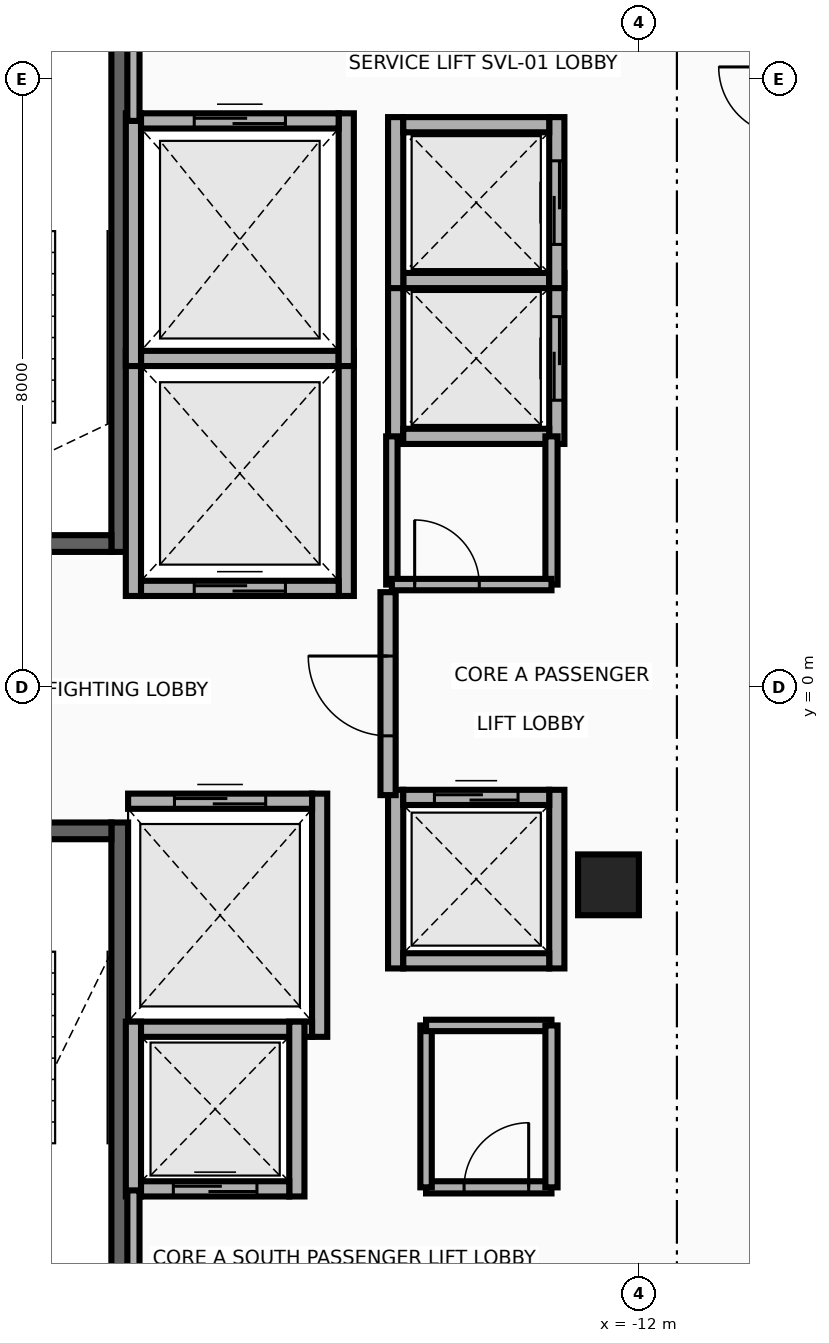
"""IFC4 building model, lengths in metres.
Left out: names, types, materials, properties, quantities, classifications, styles, units other than length and angle.
Written with IfcOpenShell. Run it as: python <this file> out.ifc"""

import sys

from ifc_helpers import new_model, si_unit, direction, frame, frame_2d, origin, origin_2d, place, context, subcontext, project, spatial, rectangle, extrude, source, transform, mapped, element, fill, save


model = new_model("IFC4")
c1 = context("Model", 3, precision=1e-05, world=origin(), true_north=direction((0.0, 1.0)))
c2 = subcontext(c1, "Body", "Model", "MODEL_VIEW")
j1 = project(units=[si_unit("LENGTHUNIT", "METRE"), si_unit("PLANEANGLEUNIT", "RADIAN")], contexts=[c1])
p1 = place(None, origin())
s1 = spatial("IfcSite", under=j1, at=p1, CompositionType="ELEMENT")
p2 = place(p1, origin())
s2 = spatial("IfcBuilding", under=s1, at=p2, CompositionType="ELEMENT")
p3 = place(p2, frame((0.0, 0.0, 258.0)))
s3 = spatial("IfcBuildingStorey", under=s2, at=p3, CompositionType="ELEMENT", Elevation=258.0)
p4 = place(p3, frame((-18.83, 1.78, 0.0), z_axis=(0.0, 0.0, 1.0), x_axis=(0.0, 1.0, 0.0)))
e1 = element("IfcWall", 1, at=p4, inside=s3, PredefinedType="SHEAR", context=c2, shape_type="SweptSolid", body=[
    extrude(rectangle(XDim=8.745, YDim=0.22, at=frame_2d((4.373, 0.0))), origin(), (0.0, 0.0, 1.0), 3.26),
])
p5 = place(p3, frame((-22.05, 1.89, 0.0), z_axis=(0.0, 0.0, 1.0), x_axis=(1.0, 0.0, 0.0)))
e2 = element("IfcWall", 2, at=p5, inside=s3, PredefinedType="SHEAR", context=c2, shape_type="SweptSolid", body=[
    extrude(rectangle(XDim=3.11, YDim=0.22, at=frame_2d((1.555, 0.0))), origin(), (0.0, 0.0, 1.0), 3.26),
])
p6 = place(p5, frame((1.0, 0.0, 0.0)))
e3 = element("IfcOpeningElement", 3, at=p6, cuts=e2, PredefinedType="OPENING", context=c2, shape_type="SweptSolid", body=[
    extrude(rectangle(XDim=1.1, YDim=2.15, at=frame_2d((0.55, 1.075))), frame((0.0, 0.125, 0.0), z_axis=(0.0, -1.0, 0.0), x_axis=(1.0, 0.0, 0.0)), (0.0, 0.0, 1.0), 0.25),
])
p7 = place(p3, frame((-18.83, -10.525, 0.0), z_axis=(0.0, 0.0, 1.0), x_axis=(0.0, 1.0, 0.0)))
e4 = element("IfcWall", 4, at=p7, inside=s3, PredefinedType="SHEAR", context=c2, shape_type="SweptSolid", body=[
    extrude(rectangle(XDim=8.745, YDim=0.22, at=frame_2d((4.373, 0.0))), origin(), (0.0, 0.0, 1.0), 3.26),
])
p8 = place(p3, frame((-22.05, -1.89, 0.0), z_axis=(0.0, 0.0, 1.0), x_axis=(1.0, 0.0, 0.0)))
e5 = element("IfcWall", 5, at=p8, inside=s3, PredefinedType="SHEAR", context=c2, shape_type="SweptSolid", body=[
    extrude(rectangle(XDim=3.11, YDim=0.22, at=frame_2d((1.555, 0.0))), origin(), (0.0, 0.0, 1.0), 3.26),
])
p9 = place(p8, frame((1.0, 0.0, 0.0)))
e6 = element("IfcOpeningElement", 6, at=p9, cuts=e5, PredefinedType="OPENING", context=c2, shape_type="SweptSolid", body=[
    extrude(rectangle(XDim=1.1, YDim=2.15, at=frame_2d((0.55, 1.075))), frame((0.0, 0.125, 0.0), z_axis=(0.0, -1.0, 0.0), x_axis=(1.0, 0.0, 0.0)), (0.0, 0.0, 1.0), 0.25),
])
m1 = source(origin(), c2, "Body", "SweptSolid", [
    extrude(rectangle(XDim=0.8, YDim=0.8, at=origin_2d()), origin(), (0.0, 0.0, 1.0), 3.5),
])
p10 = place(p3, frame((-12.4, -2.6, 0.0), z_axis=(0.0, 0.0, 1.0), x_axis=(1.0, 0.0, 0.0)))
e7 = element("IfcColumn", 7, at=p10, inside=s3, PredefinedType="COLUMN", context=c2, shape_type="MappedRepresentation", body=[
    mapped(m1, transform((0.0, 0.0, 0.0), x_axis=(1.0, 0.0, 0.0), y_axis=(0.0, 1.0, 0.0), z_axis=(0.0, 0.0, 1.0), scale=1.0)),
])
for number, where, z_axis, x_axis in (
    (8, (-18.65, 1.2, 0.0), (0.0, 0.0, 1.0), (0.0, 1.0, 0.0)),
    (9, (-15.85, 1.2, 0.0), (0.0, 0.0, 1.0), (0.0, 1.0, 0.0)),
):
    element("IfcWall", number, at=place(p3, frame(where, z_axis=z_axis, x_axis=x_axis)), inside=s3, PredefinedType="MOVABLE", context=c2, shape_type="SweptSolid", body=[
        extrude(rectangle(XDim=3.225, YDim=0.2, at=frame_2d((1.613, 0.0))), origin(), (0.0, 0.0, 1.0), 3.26),
    ])
p11 = place(p3, frame((-18.55, 1.3, 0.0), z_axis=(0.0, 0.0, 1.0), x_axis=(1.0, 0.0, 0.0)))
e10 = element("IfcWall", 10, at=p11, inside=s3, PredefinedType="MOVABLE", context=c2, shape_type="SweptSolid", body=[
    extrude(rectangle(XDim=2.6, YDim=0.2, at=frame_2d((1.3, 0.0))), origin(), (0.0, 0.0, 1.0), 3.26),
])
p12 = place(p11, frame((0.7, 0.0, 0.0)))
e11 = element("IfcOpeningElement", 11, at=p12, cuts=e10, PredefinedType="OPENING", context=c2, shape_type="SweptSolid", body=[
    extrude(rectangle(XDim=1.2, YDim=2.1, at=frame_2d((0.6, 1.05))), frame((0.0, 0.115, 0.0), z_axis=(0.0, -1.0, 0.0), x_axis=(1.0, 0.0, 0.0)), (0.0, 0.0, 1.0), 0.23),
])
p13 = place(p3, frame((-18.55, 4.325, 0.0), z_axis=(0.0, 0.0, 1.0), x_axis=(1.0, 0.0, 0.0)))
e12 = element("IfcWall", 12, at=p13, inside=s3, PredefinedType="MOVABLE", context=c2, shape_type="SweptSolid", body=[
    extrude(rectangle(XDim=2.6, YDim=0.2, at=frame_2d((1.3, 0.0))), origin(), (0.0, 0.0, 1.0), 3.26),
])
p14 = place(p3, frame((-16.2, -4.6, 0.0), z_axis=(0.0, 0.0, 1.0), x_axis=(0.0, 1.0, 0.0)))
e13 = element("IfcWall", 13, at=p14, inside=s3, PredefinedType="MOVABLE", context=c2, shape_type="SweptSolid", body=[
    extrude(rectangle(XDim=3.2, YDim=0.2, at=frame_2d((1.6, 0.0))), origin(), (0.0, 0.0, 1.0), 3.26),
])
p15 = place(p3, frame((-18.72, -4.5, 0.0), z_axis=(0.0, 0.0, 1.0), x_axis=(1.0, 0.0, 0.0)))
e14 = element("IfcWall", 14, at=p15, inside=s3, PredefinedType="MOVABLE", context=c2, shape_type="SweptSolid", body=[
    extrude(rectangle(XDim=2.42, YDim=0.2, at=frame_2d((1.21, 0.0))), origin(), (0.0, 0.0, 1.0), 3.26),
])
p16 = place(p3, frame((-18.72, -1.5, 0.0), z_axis=(0.0, 0.0, 1.0), x_axis=(1.0, 0.0, 0.0)))
e15 = element("IfcWall", 15, at=p16, inside=s3, PredefinedType="MOVABLE", context=c2, shape_type="SweptSolid", body=[
    extrude(rectangle(XDim=2.42, YDim=0.2, at=frame_2d((1.21, 0.0))), origin(), (0.0, 0.0, 1.0), 3.26),
])
p17 = place(p16, frame((0.61, 0.0, 0.0)))
e16 = element("IfcOpeningElement", 16, at=p17, cuts=e15, PredefinedType="OPENING", context=c2, shape_type="SweptSolid", body=[
    extrude(rectangle(XDim=1.2, YDim=2.1, at=frame_2d((0.6, 1.05))), frame((0.0, 0.115, 0.0), z_axis=(0.0, -1.0, 0.0), x_axis=(1.0, 0.0, 0.0)), (0.0, 0.0, 1.0), 0.23),
])
for number, where, z_axis, x_axis in (
    (17, (-18.65, 4.225, 0.0), (0.0, 0.0, 1.0), (0.0, 1.0, 0.0)),
    (18, (-15.85, 4.225, 0.0), (0.0, 0.0, 1.0), (0.0, 1.0, 0.0)),
):
    element("IfcWall", number, at=place(p3, frame(where, z_axis=z_axis, x_axis=x_axis)), inside=s3, PredefinedType="MOVABLE", context=c2, shape_type="SweptSolid", body=[
        extrude(rectangle(XDim=3.325, YDim=0.2, at=frame_2d((1.663, 0.0))), origin(), (0.0, 0.0, 1.0), 3.26),
    ])
p18 = place(p3, frame((-18.55, 7.45, 0.0), z_axis=(0.0, 0.0, 1.0), x_axis=(1.0, 0.0, 0.0)))
e19 = element("IfcWall", 19, at=p18, inside=s3, PredefinedType="MOVABLE", context=c2, shape_type="SweptSolid", body=[
    extrude(rectangle(XDim=2.6, YDim=0.2, at=frame_2d((1.3, 0.0))), origin(), (0.0, 0.0, 1.0), 3.26),
])
p19 = place(p18, frame((0.7, 0.0, 0.0)))
e20 = element("IfcOpeningElement", 20, at=p19, cuts=e19, PredefinedType="OPENING", context=c2, shape_type="SweptSolid", body=[
    extrude(rectangle(XDim=1.2, YDim=2.1, at=frame_2d((0.6, 1.05))), frame((0.0, 0.115, 0.0), z_axis=(0.0, -1.0, 0.0), x_axis=(1.0, 0.0, 0.0)), (0.0, 0.0, 1.0), 0.23),
])
p20 = place(p3, frame((-15.2, 3.2, 0.0), z_axis=(0.0, 0.0, 1.0), x_axis=(0.0, 1.0, 0.0)))
e21 = element("IfcWall", 21, at=p20, inside=s3, PredefinedType="MOVABLE", context=c2, shape_type="SweptSolid", body=[
    extrude(rectangle(XDim=2.25, YDim=0.2, at=frame_2d((1.125, 0.0))), origin(), (0.0, 0.0, 1.0), 3.26),
])
p21 = place(p3, frame((-13.08, 3.2, 0.0), z_axis=(0.0, 0.0, 1.0), x_axis=(0.0, 1.0, 0.0)))
e22 = element("IfcWall", 22, at=p21, inside=s3, PredefinedType="MOVABLE", context=c2, shape_type="SweptSolid", body=[
    extrude(rectangle(XDim=2.25, YDim=0.2, at=frame_2d((1.125, 0.0))), origin(), (0.0, 0.0, 1.0), 3.26),
])
p22 = place(p21, frame((0.575, 0.0, 0.0)))
e23 = element("IfcOpeningElement", 23, at=p22, cuts=e22, PredefinedType="OPENING", context=c2, shape_type="SweptSolid", body=[
    extrude(rectangle(XDim=1.1, YDim=2.1, at=frame_2d((0.55, 1.05))), frame((0.0, 0.115, 0.0), z_axis=(0.0, -1.0, 0.0), x_axis=(1.0, 0.0, 0.0)), (0.0, 0.0, 1.0), 0.23),
])
for number, where, z_axis, x_axis in (
    (24, (-15.1, 3.3, 0.0), (0.0, 0.0, 1.0), (1.0, 0.0, 0.0)),
    (25, (-15.1, 5.35, 0.0), (0.0, 0.0, 1.0), (1.0, 0.0, 0.0)),
):
    element("IfcWall", number, at=place(p3, frame(where, z_axis=z_axis, x_axis=x_axis)), inside=s3, PredefinedType="MOVABLE", context=c2, shape_type="SweptSolid", body=[
        extrude(rectangle(XDim=1.92, YDim=0.2, at=frame_2d((0.96, 0.0))), origin(), (0.0, 0.0, 1.0), 3.26),
    ])
p23 = place(p3, frame((-15.2, 5.25, 0.0), z_axis=(0.0, 0.0, 1.0), x_axis=(0.0, 1.0, 0.0)))
e26 = element("IfcWall", 26, at=p23, inside=s3, PredefinedType="MOVABLE", context=c2, shape_type="SweptSolid", body=[
    extrude(rectangle(XDim=2.25, YDim=0.2, at=frame_2d((1.125, 0.0))), origin(), (0.0, 0.0, 1.0), 3.26),
])
p24 = place(p3, frame((-13.08, 5.25, 0.0), z_axis=(0.0, 0.0, 1.0), x_axis=(0.0, 1.0, 0.0)))
e27 = element("IfcWall", 27, at=p24, inside=s3, PredefinedType="MOVABLE", context=c2, shape_type="SweptSolid", body=[
    extrude(rectangle(XDim=2.25, YDim=0.2, at=frame_2d((1.125, 0.0))), origin(), (0.0, 0.0, 1.0), 3.26),
])
p25 = place(p24, frame((0.575, 0.0, 0.0)))
e28 = element("IfcOpeningElement", 28, at=p25, cuts=e27, PredefinedType="OPENING", context=c2, shape_type="SweptSolid", body=[
    extrude(rectangle(XDim=1.1, YDim=2.1, at=frame_2d((0.55, 1.05))), frame((0.0, 0.115, 0.0), z_axis=(0.0, -1.0, 0.0), x_axis=(1.0, 0.0, 0.0)), (0.0, 0.0, 1.0), 0.23),
])
p26 = place(p3, frame((-15.1, 7.4, 0.0), z_axis=(0.0, 0.0, 1.0), x_axis=(1.0, 0.0, 0.0)))
e29 = element("IfcWall", 29, at=p26, inside=s3, PredefinedType="MOVABLE", context=c2, shape_type="SweptSolid", body=[
    extrude(rectangle(XDim=1.92, YDim=0.2, at=frame_2d((0.96, 0.0))), origin(), (0.0, 0.0, 1.0), 3.26),
])
for number, where, z_axis, x_axis in (
    (30, (-18.65, -6.7, 0.0), (0.0, 0.0, 1.0), (0.0, 1.0, 0.0)),
    (31, (-16.5, -6.7, 0.0), (0.0, 0.0, 1.0), (0.0, 1.0, 0.0)),
):
    element("IfcWall", number, at=place(p3, frame(where, z_axis=z_axis, x_axis=x_axis)), inside=s3, PredefinedType="MOVABLE", context=c2, shape_type="SweptSolid", body=[
        extrude(rectangle(XDim=2.3, YDim=0.2, at=frame_2d((1.15, 0.0))), origin(), (0.0, 0.0, 1.0), 3.26),
    ])
p27 = place(p3, frame((-18.55, -6.6, 0.0), z_axis=(0.0, 0.0, 1.0), x_axis=(1.0, 0.0, 0.0)))
e32 = element("IfcWall", 32, at=p27, inside=s3, PredefinedType="MOVABLE", context=c2, shape_type="SweptSolid", body=[
    extrude(rectangle(XDim=1.95, YDim=0.2, at=frame_2d((0.975, 0.0))), origin(), (0.0, 0.0, 1.0), 3.26),
])
p28 = place(p27, frame((0.425, 0.0, 0.0)))
e33 = element("IfcOpeningElement", 33, at=p28, cuts=e32, PredefinedType="OPENING", context=c2, shape_type="SweptSolid", body=[
    extrude(rectangle(XDim=1.1, YDim=2.1, at=frame_2d((0.55, 1.05))), frame((0.0, 0.115, 0.0), z_axis=(0.0, -1.0, 0.0), x_axis=(1.0, 0.0, 0.0)), (0.0, 0.0, 1.0), 0.23),
])
for number, where, z_axis, x_axis in (
    (34, (-15.2, -3.7, 0.0), (0.0, 0.0, 1.0), (0.0, 1.0, 0.0)),
    (35, (-13.08, -3.7, 0.0), (0.0, 0.0, 1.0), (0.0, 1.0, 0.0)),
):
    element("IfcWall", number, at=place(p3, frame(where, z_axis=z_axis, x_axis=x_axis)), inside=s3, PredefinedType="MOVABLE", context=c2, shape_type="SweptSolid", body=[
        extrude(rectangle(XDim=2.35, YDim=0.2, at=frame_2d((1.175, 0.0))), origin(), (0.0, 0.0, 1.0), 3.26),
    ])
p29 = place(p3, frame((-15.1, -3.6, 0.0), z_axis=(0.0, 0.0, 1.0), x_axis=(1.0, 0.0, 0.0)))
e36 = element("IfcWall", 36, at=p29, inside=s3, PredefinedType="MOVABLE", context=c2, shape_type="SweptSolid", body=[
    extrude(rectangle(XDim=1.92, YDim=0.2, at=frame_2d((0.96, 0.0))), origin(), (0.0, 0.0, 1.0), 3.26),
])
p30 = place(p3, frame((-15.1, -1.45, 0.0), z_axis=(0.0, 0.0, 1.0), x_axis=(1.0, 0.0, 0.0)))
e37 = element("IfcWall", 37, at=p30, inside=s3, PredefinedType="MOVABLE", context=c2, shape_type="SweptSolid", body=[
    extrude(rectangle(XDim=1.92, YDim=0.2, at=frame_2d((0.96, 0.0))), origin(), (0.0, 0.0, 1.0), 3.26),
])
p31 = place(p30, frame((0.41, 0.0, 0.0)))
e38 = element("IfcOpeningElement", 38, at=p31, cuts=e37, PredefinedType="OPENING", context=c2, shape_type="SweptSolid", body=[
    extrude(rectangle(XDim=1.1, YDim=2.1, at=frame_2d((0.55, 1.05))), frame((0.0, 0.115, 0.0), z_axis=(0.0, -1.0, 0.0), x_axis=(1.0, 0.0, 0.0)), (0.0, 0.0, 1.0), 0.23),
])
p32 = place(p3, frame((-15.3, -1.42, 0.0), z_axis=(0.0, 0.0, 1.0), x_axis=(0.0, 1.0, 0.0)))
e39 = element("IfcWall", 39, at=p32, inside=s3, PredefinedType="PARTITIONING", context=c2, shape_type="SweptSolid", body=[
    extrude(rectangle(XDim=2.67, YDim=0.2, at=frame_2d((1.335, 0.0))), origin(), (0.0, 0.0, 1.0), 3.26),
])
p33 = place(p32, frame((0.78, 0.0, 0.0)))
e40 = element("IfcOpeningElement", 40, at=p33, cuts=e39, PredefinedType="OPENING", context=c2, shape_type="SweptSolid", body=[
    extrude(rectangle(XDim=1.05, YDim=2.15, at=frame_2d((0.525, 1.075))), frame((0.0, 0.115, 0.0), z_axis=(0.0, -1.0, 0.0), x_axis=(1.0, 0.0, 0.0)), (0.0, 0.0, 1.0), 0.23),
])
p34 = place(p3, frame((-18.65, 7.45, 0.0), z_axis=(0.0, 0.0, 1.0), x_axis=(0.0, 1.0, 0.0)))
e41 = element("IfcWall", 41, at=p34, inside=s3, PredefinedType="PARTITIONING", context=c2, shape_type="SweptSolid", body=[
    extrude(rectangle(XDim=2.93, YDim=0.16, at=frame_2d((1.465, 0.0))), origin(), (0.0, 0.0, 1.0), 3.26),
])
p35 = place(p3, frame((-18.65, -8.18, 0.0), z_axis=(0.0, 0.0, 1.0), x_axis=(0.0, 1.0, 0.0)))
e42 = element("IfcWall", 42, at=p35, inside=s3, PredefinedType="PARTITIONING", context=c2, shape_type="SweptSolid", body=[
    extrude(rectangle(XDim=1.56, YDim=0.16, at=frame_2d((0.78, 0.0))), origin(), (0.0, 0.0, 1.0), 3.26),
])
p36 = place(p3, frame((-14.8, -6.58, 0.0), z_axis=(0.0, 0.0, 1.0), x_axis=(1.0, 0.0, 0.0)))
e43 = element("IfcWall", 43, at=p36, inside=s3, PredefinedType="PARTITIONING", context=c2, shape_type="SweptSolid", body=[
    extrude(rectangle(XDim=1.65, YDim=0.16, at=frame_2d((0.825, 0.0))), origin(), (0.0, 0.0, 1.0), 3.26),
])
p37 = place(p36, frame((0.5, 0.0, 0.0)))
e44 = element("IfcOpeningElement", 44, at=p37, cuts=e43, PredefinedType="OPENING", context=c2, shape_type="SweptSolid", body=[
    extrude(rectangle(XDim=0.85, YDim=2.05, at=frame_2d((0.425, 1.025))), frame((0.0, 0.095, 0.0), z_axis=(0.0, -1.0, 0.0), x_axis=(1.0, 0.0, 0.0)), (0.0, 0.0, 1.0), 0.19),
])
p38 = place(p3, frame((-14.8, -6.58, 0.0), z_axis=(0.0, 0.0, 1.0), x_axis=(0.0, 1.0, 0.0)))
e45 = element("IfcWall", 45, at=p38, inside=s3, PredefinedType="PARTITIONING", context=c2, shape_type="SweptSolid", body=[
    extrude(rectangle(XDim=2.13, YDim=0.15, at=frame_2d((1.065, 0.0))), origin(), (0.0, 0.0, 1.0), 3.26),
])
p39 = place(p3, frame((-14.8, -4.45, 0.0), z_axis=(0.0, 0.0, 1.0), x_axis=(1.0, 0.0, 0.0)))
e46 = element("IfcWall", 46, at=p39, inside=s3, PredefinedType="PARTITIONING", context=c2, shape_type="SweptSolid", body=[
    extrude(rectangle(XDim=1.65, YDim=0.15, at=frame_2d((0.825, 0.0))), origin(), (0.0, 0.0, 1.0), 3.26),
])
p40 = place(p3, frame((-13.15, -6.58, 0.0), z_axis=(0.0, 0.0, 1.0), x_axis=(0.0, 1.0, 0.0)))
e47 = element("IfcWall", 47, at=p40, inside=s3, PredefinedType="PARTITIONING", context=c2, shape_type="SweptSolid", body=[
    extrude(rectangle(XDim=2.13, YDim=0.16, at=frame_2d((1.065, 0.0))), origin(), (0.0, 0.0, 1.0), 3.26),
])
p41 = place(p3, frame((-13.15, 1.35, 0.0), z_axis=(0.0, 0.0, 1.0), x_axis=(0.0, 1.0, 0.0)))
e48 = element("IfcWall", 48, at=p41, inside=s3, PredefinedType="PARTITIONING", context=c2, shape_type="SweptSolid", body=[
    extrude(rectangle(XDim=1.95, YDim=0.16, at=frame_2d((0.975, 0.0))), origin(), (0.0, 0.0, 1.0), 3.26),
])
p42 = place(p3, frame((-15.25, 1.35, 0.0), z_axis=(0.0, 0.0, 1.0), x_axis=(0.0, 1.0, 0.0)))
e49 = element("IfcWall", 49, at=p42, inside=s3, PredefinedType="PARTITIONING", context=c2, shape_type="SweptSolid", body=[
    extrude(rectangle(XDim=1.95, YDim=0.15, at=frame_2d((0.975, 0.0))), origin(), (0.0, 0.0, 1.0), 3.26),
])
p43 = place(p3, frame((-15.25, 1.35, 0.0), z_axis=(0.0, 0.0, 1.0), x_axis=(1.0, 0.0, 0.0)))
e50 = element("IfcWall", 50, at=p43, inside=s3, PredefinedType="PARTITIONING", context=c2, shape_type="SweptSolid", body=[
    extrude(rectangle(XDim=2.1, YDim=0.15, at=frame_2d((1.05, 0.0))), origin(), (0.0, 0.0, 1.0), 3.26),
])
p44 = place(p43, frame((0.3, 0.0, 0.0)))
e51 = element("IfcOpeningElement", 51, at=p44, cuts=e50, PredefinedType="OPENING", context=c2, shape_type="SweptSolid", body=[
    extrude(rectangle(XDim=0.85, YDim=2.05, at=frame_2d((0.425, 1.025))), frame((0.0, 0.09, 0.0), z_axis=(0.0, -1.0, 0.0), x_axis=(1.0, 0.0, 0.0)), (0.0, 0.0, 1.0), 0.18),
])
p45 = place(p12, origin())
e52 = element("IfcDoor", 52, at=p45, inside=s3, OperationType="DOUBLE_DOOR_SLIDING", PredefinedType="DOOR", context=c2, shape_type="SweptSolid", body=[
    extrude(rectangle(XDim=1.2, YDim=2.1, at=frame_2d((0.6, 1.05))), frame((0.0, 0.025, 0.0), z_axis=(0.0, -1.0, 0.0), x_axis=(1.0, 0.0, 0.0)), (0.0, 0.0, 1.0), 0.05),
])
fill(e11, e52)
p46 = place(p17, origin())
e53 = element("IfcDoor", 53, at=p46, inside=s3, OperationType="DOUBLE_DOOR_SLIDING", PredefinedType="DOOR", context=c2, shape_type="SweptSolid", body=[
    extrude(rectangle(XDim=1.2, YDim=2.1, at=frame_2d((0.6, 1.05))), frame((0.0, 0.025, 0.0), z_axis=(0.0, -1.0, 0.0), x_axis=(1.0, 0.0, 0.0)), (0.0, 0.0, 1.0), 0.05),
])
fill(e16, e53)
p47 = place(p19, origin())
e54 = element("IfcDoor", 54, at=p47, inside=s3, OperationType="DOUBLE_DOOR_SLIDING", PredefinedType="DOOR", context=c2, shape_type="SweptSolid", body=[
    extrude(rectangle(XDim=1.2, YDim=2.1, at=frame_2d((0.6, 1.05))), frame((0.0, 0.025, 0.0), z_axis=(0.0, -1.0, 0.0), x_axis=(1.0, 0.0, 0.0)), (0.0, 0.0, 1.0), 0.05),
])
fill(e20, e54)
p48 = place(p22, origin())
e55 = element("IfcDoor", 55, at=p48, inside=s3, OperationType="DOUBLE_DOOR_SLIDING", PredefinedType="DOOR", context=c2, shape_type="SweptSolid", body=[
    extrude(rectangle(XDim=1.1, YDim=2.1, at=frame_2d((0.55, 1.05))), frame((0.0, 0.025, 0.0), z_axis=(0.0, -1.0, 0.0), x_axis=(1.0, 0.0, 0.0)), (0.0, 0.0, 1.0), 0.05),
])
fill(e23, e55)
p49 = place(p25, origin())
e56 = element("IfcDoor", 56, at=p49, inside=s3, OperationType="DOUBLE_DOOR_SLIDING", PredefinedType="DOOR", context=c2, shape_type="SweptSolid", body=[
    extrude(rectangle(XDim=1.1, YDim=2.1, at=frame_2d((0.55, 1.05))), frame((0.0, 0.025, 0.0), z_axis=(0.0, -1.0, 0.0), x_axis=(1.0, 0.0, 0.0)), (0.0, 0.0, 1.0), 0.05),
])
fill(e28, e56)
p50 = place(p28, origin())
e57 = element("IfcDoor", 57, at=p50, inside=s3, OperationType="DOUBLE_DOOR_SLIDING", PredefinedType="DOOR", context=c2, shape_type="SweptSolid", body=[
    extrude(rectangle(XDim=1.1, YDim=2.1, at=frame_2d((0.55, 1.05))), frame((0.0, 0.025, 0.0), z_axis=(0.0, -1.0, 0.0), x_axis=(1.0, 0.0, 0.0)), (0.0, 0.0, 1.0), 0.05),
])
fill(e33, e57)
p51 = place(p31, origin())
e58 = element("IfcDoor", 58, at=p51, inside=s3, OperationType="DOUBLE_DOOR_SLIDING", PredefinedType="DOOR", context=c2, shape_type="SweptSolid", body=[
    extrude(rectangle(XDim=1.1, YDim=2.1, at=frame_2d((0.55, 1.05))), frame((0.0, 0.025, 0.0), z_axis=(0.0, -1.0, 0.0), x_axis=(1.0, 0.0, 0.0)), (0.0, 0.0, 1.0), 0.05),
])
fill(e38, e58)
p52 = place(p33, origin())
e59 = element("IfcDoor", 59, at=p52, inside=s3, OperationType="SINGLE_SWING_RIGHT", PredefinedType="DOOR", context=c2, shape_type="SweptSolid", body=[
    extrude(rectangle(XDim=1.05, YDim=2.15, at=frame_2d((0.525, 1.075))), frame((0.0, 0.025, 0.0), z_axis=(0.0, -1.0, 0.0), x_axis=(1.0, 0.0, 0.0)), (0.0, 0.0, 1.0), 0.05),
])
fill(e40, e59)
p53 = place(p37, origin())
e60 = element("IfcDoor", 60, at=p53, inside=s3, OperationType="SINGLE_SWING_LEFT", PredefinedType="DOOR", context=c2, shape_type="SweptSolid", body=[
    extrude(rectangle(XDim=0.85, YDim=2.05, at=frame_2d((0.425, 1.025))), frame((0.0, 0.025, 0.0), z_axis=(0.0, -1.0, 0.0), x_axis=(1.0, 0.0, 0.0)), (0.0, 0.0, 1.0), 0.05),
])
fill(e44, e60)
p54 = place(p44, origin())
e61 = element("IfcDoor", 61, at=p54, inside=s3, OperationType="SINGLE_SWING_RIGHT", PredefinedType="DOOR", context=c2, shape_type="SweptSolid", body=[
    extrude(rectangle(XDim=0.85, YDim=2.05, at=frame_2d((0.425, 1.025))), frame((0.0, 0.025, 0.0), z_axis=(0.0, -1.0, 0.0), x_axis=(1.0, 0.0, 0.0)), (0.0, 0.0, 1.0), 0.05),
])
fill(e51, e61)
save(model, sys.argv[1])
